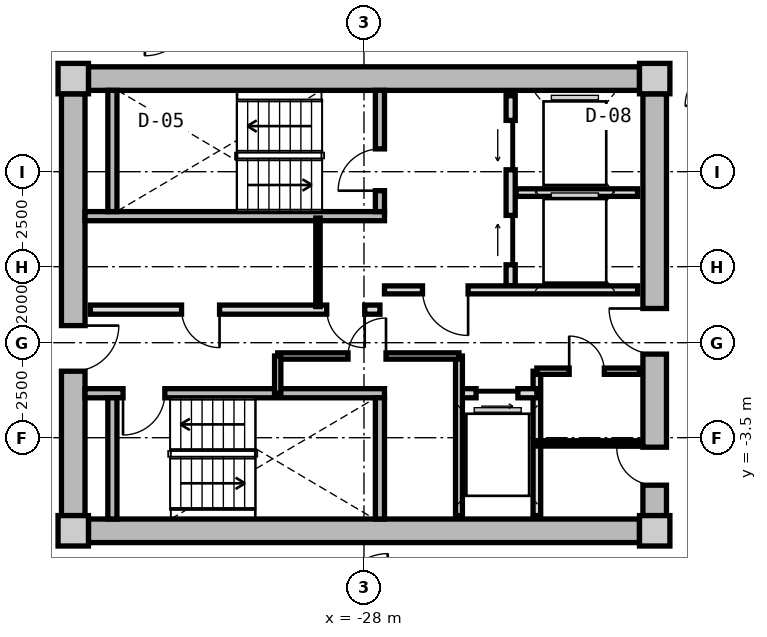
"""IFC4 building model, lengths in metres.
Left out: names, types, materials, properties, quantities, classifications, styles, units other than length and angle.
Written with IfcOpenShell. Run it as: python <this file> out.ifc"""

import sys

from ifc_helpers import new_model, si_unit, direction, frame, frame_2d, origin, origin_2d, place, context, subcontext, project, spatial, rectangle, extrude, source, transform, mapped, element, fill, save


model = new_model("IFC4")
c1 = context("Model", 3, precision=1e-05, world=origin(), true_north=direction((0.0, 1.0)))
c2 = subcontext(c1, "Body", "Model", "MODEL_VIEW")
j1 = project(units=[si_unit("LENGTHUNIT", "METRE"), si_unit("PLANEANGLEUNIT", "RADIAN")], contexts=[c1])
p1 = place(None, origin())
s1 = spatial("IfcSite", under=j1, at=p1, CompositionType="ELEMENT")
p2 = place(p1, origin())
s2 = spatial("IfcBuilding", under=s1, at=p2, CompositionType="ELEMENT")
p3 = place(p2, frame((0.0, 0.0, 167.85)))
s3 = spatial("IfcBuildingStorey", under=s2, at=p3, CompositionType="ELEMENT", Elevation=167.85)
m1 = source(origin(), c2, "Body", "SweptSolid", [
    extrude(rectangle(XDim=0.8, YDim=0.8, at=origin_2d()), origin(), (0.0, 0.0, 1.0), 3.05),
])
for number, where, z_axis, x_axis in (
    (1, (-35.65, -5.95, 0.0), (0.0, 0.0, 1.0), (1.0, 0.0, 0.0)),
    (2, (-20.35, -5.95, 0.0), (0.0, 0.0, 1.0), (1.0, 0.0, 0.0)),
    (3, (-20.35, 5.95, 0.0), (0.0, 0.0, 1.0), (1.0, 0.0, 0.0)),
    (4, (-35.65, 5.95, 0.0), (0.0, 0.0, 1.0), (1.0, 0.0, 0.0)),
):
    element("IfcColumn", number, at=place(p3, frame(where, z_axis=z_axis, x_axis=x_axis)), inside=s3, PredefinedType="COLUMN", context=c2, shape_type="MappedRepresentation", body=[
        mapped(m1, transform((0.0, 0.0, 0.0), x_axis=(1.0, 0.0, 0.0), y_axis=(0.0, 1.0, 0.0), z_axis=(0.0, 0.0, 1.0), scale=1.0)),
    ])
m2 = source(origin(), c2, "Body", "SweptSolid", [
    extrude(rectangle(XDim=14.5, YDim=0.62, at=frame_2d((7.25, 0.0))), origin(), (0.0, 0.0, 1.0), 2.81),
])
for number, where, z_axis, x_axis in (
    (5, (-35.25, 5.95, 0.0), (0.0, 0.0, 1.0), (1.0, 0.0, 0.0)),
    (6, (-20.75, -5.95, 0.0), (0.0, 0.0, 1.0), (-1.0, 0.0, 0.0)),
):
    element("IfcWall", number, at=place(p3, frame(where, z_axis=z_axis, x_axis=x_axis)), inside=s3, PredefinedType="SHEAR", context=c2, shape_type="MappedRepresentation", body=[
        mapped(m2, transform((0.0, 0.0, 0.0), x_axis=(1.0, 0.0, 0.0), y_axis=(0.0, 1.0, 0.0), z_axis=(0.0, 0.0, 1.0), scale=1.0)),
    ])
m3 = source(origin(), c2, "Body", "SweptSolid", [
    extrude(rectangle(XDim=11.1, YDim=0.62, at=frame_2d((5.55, 0.0))), origin(), (0.0, 0.0, 1.0), 2.81),
])
p4 = place(p3, frame((-35.65, -5.55, 0.0), z_axis=(0.0, 0.0, 1.0), x_axis=(0.0, 1.0, 0.0)))
e7 = element("IfcWall", 7, at=p4, inside=s3, PredefinedType="SHEAR", context=c2, shape_type="MappedRepresentation", body=[
    mapped(m3, transform((0.0, 0.0, 0.0), x_axis=(1.0, 0.0, 0.0), y_axis=(0.0, 1.0, 0.0), z_axis=(0.0, 0.0, 1.0), scale=1.0)),
])
p5 = place(p4, frame((3.8, 0.0, 0.0)))
e8 = element("IfcOpeningElement", 8, at=p5, cuts=e7, PredefinedType="OPENING", context=c2, shape_type="SweptSolid", body=[
    extrude(rectangle(XDim=1.2, YDim=2.15, at=frame_2d((0.6, 1.075))), frame((0.0, 0.32, 0.0), z_axis=(0.0, -1.0, 0.0), x_axis=(1.0, 0.0, 0.0)), (0.0, 0.0, 1.0), 0.64),
])
p6 = place(p3, frame((-20.35, 5.55, 0.0), z_axis=(0.0, 0.0, 1.0), x_axis=(0.0, -1.0, 0.0)))
e9 = element("IfcWall", 9, at=p6, inside=s3, PredefinedType="SHEAR", context=c2, shape_type="MappedRepresentation", body=[
    mapped(m3, transform((0.0, 0.0, 0.0), x_axis=(1.0, 0.0, 0.0), y_axis=(0.0, 1.0, 0.0), z_axis=(0.0, 0.0, 1.0), scale=1.0)),
])
p7 = place(p6, frame((5.65, 0.0, 0.0)))
e10 = element("IfcOpeningElement", 10, at=p7, cuts=e9, PredefinedType="OPENING", context=c2, shape_type="SweptSolid", body=[
    extrude(rectangle(XDim=1.2, YDim=2.15, at=frame_2d((0.6, 1.075))), frame((0.0, 0.32, 0.0), z_axis=(0.0, -1.0, 0.0), x_axis=(1.0, 0.0, 0.0)), (0.0, 0.0, 1.0), 0.64),
])
p8 = place(p6, frame((9.3, 0.0, 0.0)))
e11 = element("IfcOpeningElement", 11, at=p8, cuts=e9, PredefinedType="OPENING", context=c2, shape_type="SweptSolid", body=[
    extrude(rectangle(XDim=1.0, YDim=2.1, at=frame_2d((0.5, 1.05))), frame((0.0, 0.32, 0.0), z_axis=(0.0, -1.0, 0.0), x_axis=(1.0, 0.0, 0.0)), (0.0, 0.0, 1.0), 0.64),
])
m4 = source(origin(), c2, "Body", "SweptSolid", [
    extrude(rectangle(XDim=7.88, YDim=0.24, at=frame_2d((3.94, 0.0))), origin(), (0.0, 0.0, 1.0), 2.81),
])
p9 = place(p3, frame((-35.34, 2.33, 0.0), z_axis=(0.0, 0.0, 1.0), x_axis=(1.0, 0.0, 0.0)))
e12 = element("IfcWall", 12, at=p9, inside=s3, PredefinedType="PARTITIONING", context=c2, shape_type="MappedRepresentation", body=[
    mapped(m4, transform((0.0, 0.0, 0.0), x_axis=(1.0, 0.0, 0.0), y_axis=(0.0, 1.0, 0.0), z_axis=(0.0, 0.0, 1.0), scale=1.0)),
])
m5 = source(origin(), c2, "Body", "SweptSolid", [
    extrude(rectangle(XDim=3.19, YDim=0.24, at=frame_2d((1.595, 0.0))), origin(), (0.0, 0.0, 1.0), 2.81),
])
p10 = place(p3, frame((-34.62, 2.45, 0.0), z_axis=(0.0, 0.0, 1.0), x_axis=(0.0, 1.0, 0.0)))
e13 = element("IfcWall", 13, at=p10, inside=s3, PredefinedType="PARTITIONING", context=c2, shape_type="MappedRepresentation", body=[
    mapped(m5, transform((0.0, 0.0, 0.0), x_axis=(1.0, 0.0, 0.0), y_axis=(0.0, 1.0, 0.0), z_axis=(0.0, 0.0, 1.0), scale=1.0)),
])
p11 = place(p3, frame((-27.58, 2.45, 0.0), z_axis=(0.0, 0.0, 1.0), x_axis=(0.0, 1.0, 0.0)))
e14 = element("IfcWall", 14, at=p11, inside=s3, PredefinedType="PARTITIONING", context=c2, shape_type="MappedRepresentation", body=[
    mapped(m5, transform((0.0, 0.0, 0.0), x_axis=(1.0, 0.0, 0.0), y_axis=(0.0, 1.0, 0.0), z_axis=(0.0, 0.0, 1.0), scale=1.0)),
])
p12 = place(p11, frame((0.55, 0.0, 0.0)))
e15 = element("IfcOpeningElement", 15, at=p12, cuts=e14, PredefinedType="OPENING", context=c2, shape_type="SweptSolid", body=[
    extrude(rectangle(XDim=1.1, YDim=2.15, at=frame_2d((0.55, 1.075))), frame((0.0, 0.13, 0.0), z_axis=(0.0, -1.0, 0.0), x_axis=(1.0, 0.0, 0.0)), (0.0, 0.0, 1.0), 0.26),
])
p13 = place(p3, frame((-35.34, -2.33, 0.0), z_axis=(0.0, 0.0, 1.0), x_axis=(1.0, 0.0, 0.0)))
e16 = element("IfcWall", 16, at=p13, inside=s3, PredefinedType="PARTITIONING", context=c2, shape_type="MappedRepresentation", body=[
    mapped(m4, transform((0.0, 0.0, 0.0), x_axis=(1.0, 0.0, 0.0), y_axis=(0.0, 1.0, 0.0), z_axis=(0.0, 0.0, 1.0), scale=1.0)),
])
p14 = place(p13, frame((1.0, 0.0, 0.0)))
e17 = element("IfcOpeningElement", 17, at=p14, cuts=e16, PredefinedType="OPENING", context=c2, shape_type="SweptSolid", body=[
    extrude(rectangle(XDim=1.1, YDim=2.15, at=frame_2d((0.55, 1.075))), frame((0.0, 0.13, 0.0), z_axis=(0.0, -1.0, 0.0), x_axis=(1.0, 0.0, 0.0)), (0.0, 0.0, 1.0), 0.26),
])
for number, where, z_axis, x_axis in (
    (18, (-34.62, -5.64, 0.0), (0.0, 0.0, 1.0), (0.0, 1.0, 0.0)),
    (19, (-27.58, -5.64, 0.0), (0.0, 0.0, 1.0), (0.0, 1.0, 0.0)),
):
    element("IfcWall", number, at=place(p3, frame(where, z_axis=z_axis, x_axis=x_axis)), inside=s3, PredefinedType="PARTITIONING", context=c2, shape_type="MappedRepresentation", body=[
        mapped(m5, transform((0.0, 0.0, 0.0), x_axis=(1.0, 0.0, 0.0), y_axis=(0.0, 1.0, 0.0), z_axis=(0.0, 0.0, 1.0), scale=1.0)),
    ])
m6 = source(origin(), c2, "Body", "SweptSolid", [
    extrude(rectangle(XDim=5.0, YDim=0.24, at=frame_2d((2.5, 0.0))), origin(), (0.0, 0.0, 1.0), 2.795),
])
p15 = place(p3, frame((-24.14, 0.5, 0.0), z_axis=(0.0, 0.0, 1.0), x_axis=(0.0, 1.0, 0.0)))
e20 = element("IfcWall", 20, at=p15, inside=s3, PredefinedType="PARTITIONING", context=c2, shape_type="MappedRepresentation", body=[
    mapped(m6, transform((0.0, 0.0, 0.0), x_axis=(1.0, 0.0, 0.0), y_axis=(0.0, 1.0, 0.0), z_axis=(0.0, 0.0, 1.0), scale=1.0)),
])
p16 = place(p15, frame((3.05, 0.0, 0.0)))
e21 = element("IfcOpeningElement", 21, at=p16, cuts=e20, PredefinedType="OPENING", context=c2, shape_type="SweptSolid", body=[
    extrude(rectangle(XDim=1.3, YDim=2.2, at=frame_2d((0.65, 1.1))), frame((0.0, 0.13, 0.0), z_axis=(0.0, -1.0, 0.0), x_axis=(1.0, 0.0, 0.0)), (0.0, 0.0, 1.0), 0.26),
])
p17 = place(p15, frame((0.55, 0.0, 0.0)))
e22 = element("IfcOpeningElement", 22, at=p17, cuts=e20, PredefinedType="OPENING", context=c2, shape_type="SweptSolid", body=[
    extrude(rectangle(XDim=1.3, YDim=2.2, at=frame_2d((0.65, 1.1))), frame((0.0, 0.13, 0.0), z_axis=(0.0, -1.0, 0.0), x_axis=(1.0, 0.0, 0.0)), (0.0, 0.0, 1.0), 0.26),
])
m7 = source(origin(), c2, "Body", "SweptSolid", [
    extrude(rectangle(XDim=3.2, YDim=0.2, at=frame_2d((1.6, 0.0))), origin(), (0.0, 0.0, 1.0), 2.795),
])
p18 = place(p3, frame((-24.0, 2.95, 0.0), z_axis=(0.0, 0.0, 1.0), x_axis=(1.0, 0.0, 0.0)))
e23 = element("IfcWall", 23, at=p18, inside=s3, PredefinedType="PARTITIONING", context=c2, shape_type="MappedRepresentation", body=[
    mapped(m7, transform((0.0, 0.0, 0.0), x_axis=(1.0, 0.0, 0.0), y_axis=(0.0, 1.0, 0.0), z_axis=(0.0, 0.0, 1.0), scale=1.0)),
])
m8 = source(origin(), c2, "Body", "SweptSolid", [
    extrude(rectangle(XDim=6.66, YDim=0.21, at=frame_2d((3.33, 0.0))), origin(), (0.0, 0.0, 1.0), 2.795),
])
p19 = place(p3, frame((-27.46, 0.39, 0.0), z_axis=(0.0, 0.0, 1.0), x_axis=(1.0, 0.0, 0.0)))
e24 = element("IfcWall", 24, at=p19, inside=s3, PredefinedType="PARTITIONING", context=c2, shape_type="MappedRepresentation", body=[
    mapped(m8, transform((0.0, 0.0, 0.0), x_axis=(1.0, 0.0, 0.0), y_axis=(0.0, 1.0, 0.0), z_axis=(0.0, 0.0, 1.0), scale=1.0)),
])
p20 = place(p19, frame((1.0, 0.0, 0.0)))
e25 = element("IfcOpeningElement", 25, at=p20, cuts=e24, PredefinedType="OPENING", context=c2, shape_type="SweptSolid", body=[
    extrude(rectangle(XDim=1.2, YDim=2.15, at=frame_2d((0.6, 1.075))), frame((0.0, 0.115, 0.0), z_axis=(0.0, -1.0, 0.0), x_axis=(1.0, 0.0, 0.0)), (0.0, 0.0, 1.0), 0.23),
])
m9 = source(origin(), c2, "Body", "SweptSolid", [
    extrude(rectangle(XDim=7.62, YDim=0.24, at=frame_2d((3.81, 0.0))), origin(), (0.0, 0.0, 1.0), 2.795),
])
p21 = place(p3, frame((-35.2, -0.13, 0.0), z_axis=(0.0, 0.0, 1.0), x_axis=(1.0, 0.0, 0.0)))
e26 = element("IfcWall", 26, at=p21, inside=s3, PredefinedType="PARTITIONING", context=c2, shape_type="MappedRepresentation", body=[
    mapped(m9, transform((0.0, 0.0, 0.0), x_axis=(1.0, 0.0, 0.0), y_axis=(0.0, 1.0, 0.0), z_axis=(0.0, 0.0, 1.0), scale=1.0)),
])
p22 = place(p21, frame((6.22, 0.0, 0.0)))
e27 = element("IfcOpeningElement", 27, at=p22, cuts=e26, PredefinedType="OPENING", context=c2, shape_type="SweptSolid", body=[
    extrude(rectangle(XDim=1.0, YDim=2.1, at=frame_2d((0.5, 1.05))), frame((0.0, 0.13, 0.0), z_axis=(0.0, -1.0, 0.0), x_axis=(1.0, 0.0, 0.0)), (0.0, 0.0, 1.0), 0.26),
])
p23 = place(p21, frame((2.4, 0.0, 0.0)))
e28 = element("IfcOpeningElement", 28, at=p23, cuts=e26, PredefinedType="OPENING", context=c2, shape_type="SweptSolid", body=[
    extrude(rectangle(XDim=1.0, YDim=2.1, at=frame_2d((0.5, 1.05))), frame((0.0, 0.13, 0.0), z_axis=(0.0, -1.0, 0.0), x_axis=(1.0, 0.0, 0.0)), (0.0, 0.0, 1.0), 0.26),
])
m10 = source(origin(), c2, "Body", "SweptSolid", [
    extrude(rectangle(XDim=2.33, YDim=0.115, at=frame_2d((1.165, 0.0))), origin(), (0.0, 0.0, 1.0), 2.795),
])
p24 = place(p3, frame((-29.21, -0.05, 0.0), z_axis=(0.0, 0.0, 1.0), x_axis=(0.0, 1.0, 0.0)))
e29 = element("IfcWall", 29, at=p24, inside=s3, PredefinedType="PARTITIONING", context=c2, shape_type="MappedRepresentation", body=[
    mapped(m10, transform((0.0, 0.0, 0.0), x_axis=(1.0, 0.0, 0.0), y_axis=(0.0, 1.0, 0.0), z_axis=(0.0, 0.0, 1.0), scale=1.0)),
])
m11 = source(origin(), c2, "Body", "SweptSolid", [
    extrude(rectangle(XDim=3.8, YDim=0.2, at=frame_2d((1.9, 0.0))), origin(), (0.0, 0.0, 1.0), 2.795),
])
p25 = place(p3, frame((-23.45, -5.55, 0.0), z_axis=(0.0, 0.0, 1.0), x_axis=(0.0, 1.0, 0.0)))
e30 = element("IfcWall", 30, at=p25, inside=s3, PredefinedType="PARTITIONING", context=c2, shape_type="MappedRepresentation", body=[
    mapped(m11, transform((0.0, 0.0, 0.0), x_axis=(1.0, 0.0, 0.0), y_axis=(0.0, 1.0, 0.0), z_axis=(0.0, 0.0, 1.0), scale=1.0)),
])
m12 = source(origin(), c2, "Body", "SweptSolid", [
    extrude(rectangle(XDim=2.05, YDim=0.24, at=frame_2d((1.025, 0.0))), origin(), (0.0, 0.0, 1.0), 2.795),
])
p26 = place(p3, frame((-25.5, -2.33, 0.0), z_axis=(0.0, 0.0, 1.0), x_axis=(1.0, 0.0, 0.0)))
e31 = element("IfcWall", 31, at=p26, inside=s3, PredefinedType="PARTITIONING", context=c2, shape_type="MappedRepresentation", body=[
    mapped(m12, transform((0.0, 0.0, 0.0), x_axis=(1.0, 0.0, 0.0), y_axis=(0.0, 1.0, 0.0), z_axis=(0.0, 0.0, 1.0), scale=1.0)),
])
p27 = place(p26, frame((0.45, 0.0, 0.0)))
e32 = element("IfcOpeningElement", 32, at=p27, cuts=e31, PredefinedType="OPENING", context=c2, shape_type="SweptSolid", body=[
    extrude(rectangle(XDim=1.1, YDim=2.2, at=frame_2d((0.55, 1.1))), frame((0.0, 0.13, 0.0), z_axis=(0.0, -1.0, 0.0), x_axis=(1.0, 0.0, 0.0)), (0.0, 0.0, 1.0), 0.26),
])
m13 = source(origin(), c2, "Body", "SweptSolid", [
    extrude(rectangle(XDim=4.2, YDim=0.18, at=frame_2d((2.1, 0.0))), origin(), (0.0, 0.0, 1.0), 2.795),
])
p28 = place(p3, frame((-25.5, -5.55, 0.0), z_axis=(0.0, 0.0, 1.0), x_axis=(0.0, 1.0, 0.0)))
e33 = element("IfcWall", 33, at=p28, inside=s3, PredefinedType="PARTITIONING", context=c2, shape_type="MappedRepresentation", body=[
    mapped(m13, transform((0.0, 0.0, 0.0), x_axis=(1.0, 0.0, 0.0), y_axis=(0.0, 1.0, 0.0), z_axis=(0.0, 0.0, 1.0), scale=1.0)),
])
m14 = source(origin(), c2, "Body", "SweptSolid", [
    extrude(rectangle(XDim=4.77, YDim=0.165, at=frame_2d((2.385, 0.0))), origin(), (0.0, 0.0, 1.0), 2.795),
])
p29 = place(p3, frame((-30.27, -1.35, 0.0), z_axis=(0.0, 0.0, 1.0), x_axis=(1.0, 0.0, 0.0)))
e34 = element("IfcWall", 34, at=p29, inside=s3, PredefinedType="PARTITIONING", context=c2, shape_type="MappedRepresentation", body=[
    mapped(m14, transform((0.0, 0.0, 0.0), x_axis=(1.0, 0.0, 0.0), y_axis=(0.0, 1.0, 0.0), z_axis=(0.0, 0.0, 1.0), scale=1.0)),
])
p30 = place(p29, frame((1.85, 0.0, 0.0)))
e35 = element("IfcOpeningElement", 35, at=p30, cuts=e34, PredefinedType="OPENING", context=c2, shape_type="SweptSolid", body=[
    extrude(rectangle(XDim=1.0, YDim=2.1, at=frame_2d((0.5, 1.05))), frame((0.0, 0.093, 0.0), z_axis=(0.0, -1.0, 0.0), x_axis=(1.0, 0.0, 0.0)), (0.0, 0.0, 1.0), 0.185),
])
m15 = source(origin(), c2, "Body", "SweptSolid", [
    extrude(rectangle(XDim=0.98, YDim=0.165, at=frame_2d((0.49, 0.0))), origin(), (0.0, 0.0, 1.0), 2.795),
])
p31 = place(p3, frame((-30.27, -2.33, 0.0), z_axis=(0.0, 0.0, 1.0), x_axis=(0.0, 1.0, 0.0)))
e36 = element("IfcWall", 36, at=p31, inside=s3, PredefinedType="PARTITIONING", context=c2, shape_type="MappedRepresentation", body=[
    mapped(m15, transform((0.0, 0.0, 0.0), x_axis=(1.0, 0.0, 0.0), y_axis=(0.0, 1.0, 0.0), z_axis=(0.0, 0.0, 1.0), scale=1.0)),
])
m16 = source(origin(), c2, "Body", "SweptSolid", [
    extrude(rectangle(XDim=2.7, YDim=0.165, at=frame_2d((1.35, 0.0))), origin(), (0.0, 0.0, 1.0), 2.795),
])
p32 = place(p3, frame((-23.45, -1.75, 0.0), z_axis=(0.0, 0.0, 1.0), x_axis=(1.0, 0.0, 0.0)))
e37 = element("IfcWall", 37, at=p32, inside=s3, PredefinedType="PARTITIONING", context=c2, shape_type="MappedRepresentation", body=[
    mapped(m16, transform((0.0, 0.0, 0.0), x_axis=(1.0, 0.0, 0.0), y_axis=(0.0, 1.0, 0.0), z_axis=(0.0, 0.0, 1.0), scale=1.0)),
])
p33 = place(p32, frame((0.85, 0.0, 0.0)))
e38 = element("IfcOpeningElement", 38, at=p33, cuts=e37, PredefinedType="OPENING", context=c2, shape_type="SweptSolid", body=[
    extrude(rectangle(XDim=0.925, YDim=2.1, at=frame_2d((0.462, 1.05))), frame((0.0, 0.093, 0.0), z_axis=(0.0, -1.0, 0.0), x_axis=(1.0, 0.0, 0.0)), (0.0, 0.0, 1.0), 0.185),
])
m17 = source(origin(), c2, "Body", "SweptSolid", [
    extrude(rectangle(XDim=2.7, YDim=0.14, at=frame_2d((1.35, 0.0))), origin(), (0.0, 0.0, 1.0), 2.795),
])
p34 = place(p3, frame((-23.45, -3.65, 0.0), z_axis=(0.0, 0.0, 1.0), x_axis=(1.0, 0.0, 0.0)))
e39 = element("IfcWall", 39, at=p34, inside=s3, PredefinedType="PARTITIONING", context=c2, shape_type="MappedRepresentation", body=[
    mapped(m17, transform((0.0, 0.0, 0.0), x_axis=(1.0, 0.0, 0.0), y_axis=(0.0, 1.0, 0.0), z_axis=(0.0, 0.0, 1.0), scale=1.0)),
])
m18 = source(origin(), c2, "Body", "SweptSolid", [
    extrude(rectangle(XDim=1.1, YDim=2.15, at=frame_2d((0.55, 1.075))), frame((0.0, 0.025, 0.0), z_axis=(0.0, -1.0, 0.0), x_axis=(1.0, 0.0, 0.0)), (0.0, 0.0, 1.0), 0.05),
])
p35 = place(p12, origin())
e40 = element("IfcDoor", 40, at=p35, inside=s3, OperationType="SINGLE_SWING_LEFT", PredefinedType="DOOR", context=c2, shape_type="MappedRepresentation", body=[
    mapped(m18, transform((0.0, 0.0, 0.0), x_axis=(1.0, 0.0, 0.0), y_axis=(0.0, 1.0, 0.0), z_axis=(0.0, 0.0, 1.0), scale=1.0)),
])
fill(e15, e40)
p36 = place(p14, frame((1.1, 0.0, 0.0), z_axis=(0.0, 0.0, 1.0), x_axis=(-1.0, 0.0, 0.0)))
e41 = element("IfcDoor", 41, at=p36, inside=s3, OperationType="SINGLE_SWING_RIGHT", PredefinedType="DOOR", context=c2, shape_type="MappedRepresentation", body=[
    mapped(m18, transform((0.0, 0.0, 0.0), x_axis=(1.0, 0.0, 0.0), y_axis=(0.0, 1.0, 0.0), z_axis=(0.0, 0.0, 1.0), scale=1.0)),
])
fill(e17, e41)
m19 = source(origin(), c2, "Body", "SweptSolid", [
    extrude(rectangle(XDim=1.3, YDim=2.2, at=frame_2d((0.65, 1.1))), frame((0.0, 0.025, 0.0), z_axis=(0.0, -1.0, 0.0), x_axis=(1.0, 0.0, 0.0)), (0.0, 0.0, 1.0), 0.05),
])
p37 = place(p16, origin())
e42 = element("IfcDoor", 42, at=p37, inside=s3, OperationType="SLIDING_TO_LEFT", PredefinedType="DOOR", context=c2, shape_type="MappedRepresentation", body=[
    mapped(m19, transform((0.0, 0.0, 0.0), x_axis=(1.0, 0.0, 0.0), y_axis=(0.0, 1.0, 0.0), z_axis=(0.0, 0.0, 1.0), scale=1.0)),
])
fill(e21, e42)
p38 = place(p17, origin())
e43 = element("IfcDoor", 43, at=p38, inside=s3, OperationType="SLIDING_TO_RIGHT", PredefinedType="DOOR", context=c2, shape_type="MappedRepresentation", body=[
    mapped(m19, transform((0.0, 0.0, 0.0), x_axis=(1.0, 0.0, 0.0), y_axis=(0.0, 1.0, 0.0), z_axis=(0.0, 0.0, 1.0), scale=1.0)),
])
fill(e22, e43)
m20 = source(origin(), c2, "Body", "SweptSolid", [
    extrude(rectangle(XDim=1.2, YDim=2.15, at=frame_2d((0.6, 1.075))), frame((0.0, 0.025, 0.0), z_axis=(0.0, -1.0, 0.0), x_axis=(1.0, 0.0, 0.0)), (0.0, 0.0, 1.0), 0.05),
])
p39 = place(p20, frame((1.2, 0.0, 0.0), z_axis=(0.0, 0.0, 1.0), x_axis=(-1.0, 0.0, 0.0)))
e44 = element("IfcDoor", 44, at=p39, inside=s3, OperationType="SINGLE_SWING_LEFT", PredefinedType="DOOR", context=c2, shape_type="MappedRepresentation", body=[
    mapped(m20, transform((0.0, 0.0, 0.0), x_axis=(1.0, 0.0, 0.0), y_axis=(0.0, 1.0, 0.0), z_axis=(0.0, 0.0, 1.0), scale=1.0)),
])
fill(e25, e44)
p40 = place(p5, frame((1.2, 0.0, 0.0), z_axis=(0.0, 0.0, 1.0), x_axis=(-1.0, 0.0, 0.0)))
e45 = element("IfcDoor", 45, at=p40, inside=s3, OperationType="SINGLE_SWING_LEFT", PredefinedType="DOOR", context=c2, shape_type="MappedRepresentation", body=[
    mapped(m20, transform((0.0, 0.0, 0.0), x_axis=(1.0, 0.0, 0.0), y_axis=(0.0, 1.0, 0.0), z_axis=(0.0, 0.0, 1.0), scale=1.0)),
])
fill(e8, e45)
p41 = place(p7, frame((1.2, 0.0, 0.0), z_axis=(0.0, 0.0, 1.0), x_axis=(-1.0, 0.0, 0.0)))
e46 = element("IfcDoor", 46, at=p41, inside=s3, OperationType="SINGLE_SWING_RIGHT", PredefinedType="DOOR", context=c2, shape_type="MappedRepresentation", body=[
    mapped(m20, transform((0.0, 0.0, 0.0), x_axis=(1.0, 0.0, 0.0), y_axis=(0.0, 1.0, 0.0), z_axis=(0.0, 0.0, 1.0), scale=1.0)),
])
fill(e10, e46)
m21 = source(origin(), c2, "Body", "SweptSolid", [
    extrude(rectangle(XDim=1.0, YDim=2.1, at=frame_2d((0.5, 1.05))), frame((0.0, 0.025, 0.0), z_axis=(0.0, -1.0, 0.0), x_axis=(1.0, 0.0, 0.0)), (0.0, 0.0, 1.0), 0.05),
])
p42 = place(p22, frame((1.0, 0.0, 0.0), z_axis=(0.0, 0.0, 1.0), x_axis=(-1.0, 0.0, 0.0)))
e47 = element("IfcDoor", 47, at=p42, inside=s3, OperationType="SINGLE_SWING_LEFT", PredefinedType="DOOR", context=c2, shape_type="MappedRepresentation", body=[
    mapped(m21, transform((0.0, 0.0, 0.0), x_axis=(1.0, 0.0, 0.0), y_axis=(0.0, 1.0, 0.0), z_axis=(0.0, 0.0, 1.0), scale=1.0)),
])
fill(e27, e47)
p43 = place(p23, frame((1.0, 0.0, 0.0), z_axis=(0.0, 0.0, 1.0), x_axis=(-1.0, 0.0, 0.0)))
e48 = element("IfcDoor", 48, at=p43, inside=s3, OperationType="SINGLE_SWING_LEFT", PredefinedType="DOOR", context=c2, shape_type="MappedRepresentation", body=[
    mapped(m21, transform((0.0, 0.0, 0.0), x_axis=(1.0, 0.0, 0.0), y_axis=(0.0, 1.0, 0.0), z_axis=(0.0, 0.0, 1.0), scale=1.0)),
])
fill(e28, e48)
m22 = source(origin(), c2, "Body", "SweptSolid", [
    extrude(rectangle(XDim=1.1, YDim=2.2, at=frame_2d((0.55, 1.1))), frame((0.0, 0.025, 0.0), z_axis=(0.0, -1.0, 0.0), x_axis=(1.0, 0.0, 0.0)), (0.0, 0.0, 1.0), 0.05),
])
p44 = place(p27, frame((1.1, 0.0, 0.0), z_axis=(0.0, 0.0, 1.0), x_axis=(-1.0, 0.0, 0.0)))
e49 = element("IfcDoor", 49, at=p44, inside=s3, OperationType="SLIDING_TO_RIGHT", PredefinedType="DOOR", context=c2, shape_type="MappedRepresentation", body=[
    mapped(m22, transform((0.0, 0.0, 0.0), x_axis=(1.0, 0.0, 0.0), y_axis=(0.0, 1.0, 0.0), z_axis=(0.0, 0.0, 1.0), scale=1.0)),
])
fill(e32, e49)
p45 = place(p30, origin())
e50 = element("IfcDoor", 50, at=p45, inside=s3, OperationType="SINGLE_SWING_RIGHT", PredefinedType="DOOR", context=c2, shape_type="MappedRepresentation", body=[
    mapped(m21, transform((0.0, 0.0, 0.0), x_axis=(1.0, 0.0, 0.0), y_axis=(0.0, 1.0, 0.0), z_axis=(0.0, 0.0, 1.0), scale=1.0)),
])
fill(e35, e50)
m23 = source(origin(), c2, "Body", "SweptSolid", [
    extrude(rectangle(XDim=0.925, YDim=2.1, at=frame_2d((0.462, 1.05))), frame((0.0, 0.025, 0.0), z_axis=(0.0, -1.0, 0.0), x_axis=(1.0, 0.0, 0.0)), (0.0, 0.0, 1.0), 0.05),
])
p46 = place(p33, origin())
e51 = element("IfcDoor", 51, at=p46, inside=s3, OperationType="SINGLE_SWING_LEFT", PredefinedType="DOOR", context=c2, shape_type="MappedRepresentation", body=[
    mapped(m23, transform((0.0, 0.0, 0.0), x_axis=(1.0, 0.0, 0.0), y_axis=(0.0, 1.0, 0.0), z_axis=(0.0, 0.0, 1.0), scale=1.0)),
])
fill(e38, e51)
p47 = place(p8, frame((1.0, 0.0, 0.0), z_axis=(0.0, 0.0, 1.0), x_axis=(-1.0, 0.0, 0.0)))
e52 = element("IfcDoor", 52, at=p47, inside=s3, OperationType="SINGLE_SWING_RIGHT", PredefinedType="DOOR", context=c2, shape_type="MappedRepresentation", body=[
    mapped(m21, transform((0.0, 0.0, 0.0), x_axis=(1.0, 0.0, 0.0), y_axis=(0.0, 1.0, 0.0), z_axis=(0.0, 0.0, 1.0), scale=1.0)),
])
fill(e11, e52)
save(model, sys.argv[1])
